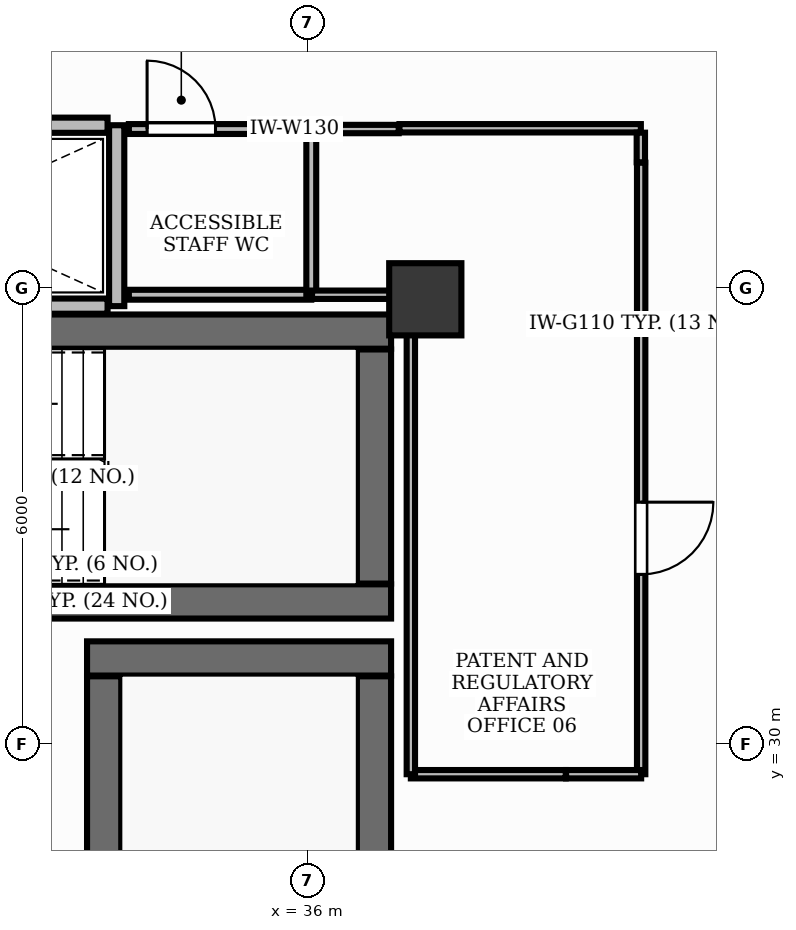
"""IFC4 building model, lengths in metres.
Left out: names, types, materials, properties, quantities, classifications, styles, units other than length and angle.
Written with IfcOpenShell. Run it as: python <this file> out.ifc"""

import sys

from ifc_helpers import new_model, si_unit, direction, frame, frame_2d, origin, origin_2d, place, context, subcontext, project, spatial, rectangle, extrude, element, fill, save


model = new_model("IFC4")
c1 = context("Model", 3, precision=1e-05, world=origin(), true_north=direction((0.0, 1.0)))
c2 = subcontext(c1, "Body", "Model", "MODEL_VIEW")
j1 = project(units=[si_unit("LENGTHUNIT", "METRE"), si_unit("PLANEANGLEUNIT", "RADIAN")], contexts=[c1])
p1 = place(None, origin())
s1 = spatial("IfcSite", under=j1, at=p1, CompositionType="ELEMENT")
p2 = place(p1, origin())
s2 = spatial("IfcBuilding", under=s1, at=p2, CompositionType="ELEMENT")
p3 = place(p2, frame((0.0, 0.0, 123.6)))
s3 = spatial("IfcBuildingStorey", under=s2, at=p3, CompositionType="ELEMENT", Elevation=123.6)
p4 = place(p3, frame((28.852, 35.425, 0.0), z_axis=(0.0, 0.0, 1.0), x_axis=(1.0, 0.0, 0.0)))
e1 = element("IfcWall", 1, at=p4, inside=s3, PredefinedType="SHEAR", context=c2, shape_type="SweptSolid", body=[
    extrude(rectangle(XDim=8.248, YDim=0.45, at=frame_2d((4.124, 0.0))), origin(), (0.0, 0.0, 1.0), 3.9),
])
p5 = place(p3, frame((28.35, 31.875, 0.0), z_axis=(0.0, 0.0, 1.0), x_axis=(1.0, 0.0, 0.0)))
e2 = element("IfcWall", 2, at=p5, inside=s3, PredefinedType="SHEAR", context=c2, shape_type="SweptSolid", body=[
    extrude(rectangle(XDim=8.75, YDim=0.45, at=frame_2d((4.375, 0.0))), origin(), (0.0, 0.0, 1.0), 3.9),
])
p6 = place(p3, frame((36.875, 32.11, 0.0), z_axis=(0.0, 0.0, 1.0), x_axis=(0.0, 1.0, 0.0)))
e3 = element("IfcWall", 3, at=p6, inside=s3, PredefinedType="SHEAR", context=c2, shape_type="SweptSolid", body=[
    extrude(rectangle(XDim=3.08, YDim=0.45, at=frame_2d((1.54, 0.0))), origin(), (0.0, 0.0, 1.0), 3.9),
])
p7 = place(p3, frame((33.1, 31.125, 0.0), z_axis=(0.0, 0.0, 1.0), x_axis=(1.0, 0.0, 0.0)))
e4 = element("IfcWall", 4, at=p7, inside=s3, PredefinedType="SHEAR", context=c2, shape_type="SweptSolid", body=[
    extrude(rectangle(XDim=4.0, YDim=0.45, at=frame_2d((2.0, 0.0))), origin(), (0.0, 0.0, 1.0), 3.9),
])
p8 = place(p3, frame((36.875, 23.11, 0.0), z_axis=(0.0, 0.0, 1.0), x_axis=(0.0, 1.0, 0.0)))
e5 = element("IfcWall", 5, at=p8, inside=s3, PredefinedType="SHEAR", context=c2, shape_type="SweptSolid", body=[
    extrude(rectangle(XDim=7.78, YDim=0.45, at=frame_2d((3.89, 0.0))), origin(), (0.0, 0.0, 1.0), 3.9),
])
p9 = place(p3, frame((33.325, 23.11, 0.0), z_axis=(0.0, 0.0, 1.0), x_axis=(0.0, 1.0, 0.0)))
e6 = element("IfcWall", 6, at=p9, inside=s3, PredefinedType="SHEAR", context=c2, shape_type="SweptSolid", body=[
    extrude(rectangle(XDim=7.78, YDim=0.45, at=frame_2d((3.89, 0.0))), origin(), (0.0, 0.0, 1.0), 3.9),
])
p10 = place(p9, frame((0.2, 0.0, 0.0)))
e7 = element("IfcOpeningElement", 7, at=p10, cuts=e6, PredefinedType="OPENING", context=c2, shape_type="SweptSolid", body=[
    extrude(rectangle(XDim=1.05, YDim=2.15, at=frame_2d((0.525, 1.075))), frame((0.0, 0.24, 0.0), z_axis=(0.0, -1.0, 0.0), x_axis=(1.0, 0.0, 0.0)), (0.0, 0.0, 1.0), 0.48),
])
p11 = place(p3, frame((37.55, 35.85, -0.0), z_axis=(0.0, 0.0, 1.0), x_axis=(1.0, 0.0, 0.0)))
e8 = element("IfcColumn", 8, at=p11, inside=s3, PredefinedType="PILASTER", context=c2, shape_type="SweptSolid", body=[
    extrude(rectangle(XDim=0.95, YDim=0.95, at=origin_2d()), origin(), (0.0, 0.0, 1.0), 3.901),
])
p12 = place(p3, frame((33.49, 35.76, 0.0), z_axis=(0.0, 0.0, 1.0), x_axis=(0.0, 1.0, 0.0)))
e9 = element("IfcWall", 9, at=p12, inside=s3, PredefinedType="PARTITIONING", context=c2, shape_type="SweptSolid", body=[
    extrude(rectangle(XDim=2.38, YDim=0.2, at=frame_2d((1.19, 0.0))), origin(), (0.0, 0.0, 1.0), 2.91),
])
for number, where, z_axis, x_axis in (
    (10, (28.8, 35.76, 0.0), (0.0, 0.0, 1.0), (1.0, 0.0, 0.0)),
    (11, (28.8, 38.14, 0.0), (0.0, 0.0, 1.0), (1.0, 0.0, 0.0)),
):
    element("IfcWall", number, at=place(p3, frame(where, z_axis=z_axis, x_axis=x_axis)), inside=s3, PredefinedType="PARTITIONING", context=c2, shape_type="SweptSolid", body=[
        extrude(rectangle(XDim=4.57, YDim=0.2, at=frame_2d((2.285, 0.0))), origin(), (0.0, 0.0, 1.0), 2.91),
    ])
p13 = place(p3, frame((33.65, 38.09, 0.0), z_axis=(0.0, 0.0, 1.0), x_axis=(1.0, 0.0, 0.0)))
e12 = element("IfcWall", 12, at=p13, inside=s3, PredefinedType="PARTITIONING", context=c2, shape_type="SweptSolid", body=[
    extrude(rectangle(XDim=2.4, YDim=0.13, at=frame_2d((1.2, 0.0))), origin(), (0.0, 0.0, 1.0), 2.91),
])
p14 = place(p13, frame((0.24, 0.0, 0.0)))
e13 = element("IfcOpeningElement", 13, at=p14, cuts=e12, PredefinedType="OPENING", context=c2, shape_type="SweptSolid", body=[
    extrude(rectangle(XDim=0.9, YDim=2.15, at=frame_2d((0.45, 1.075))), frame((0.0, 0.08, 0.0), z_axis=(0.0, -1.0, 0.0), x_axis=(1.0, 0.0, 0.0)), (0.0, 0.0, 1.0), 0.16),
])
p15 = place(p3, frame((40.39, 37.648, 0.0), z_axis=(0.0, 0.0, 1.0), x_axis=(0.0, -1.0, 0.0)))
e14 = element("IfcWall", 14, at=p15, inside=s3, PredefinedType="MOVABLE", context=c2, shape_type="SweptSolid", body=[
    extrude(rectangle(XDim=8.046, YDim=0.11, at=frame_2d((4.023, 0.0))), origin(), (0.0, 0.0, 1.0), 2.91),
])
p16 = place(p15, frame((4.467, 0.0, 0.0)))
e15 = element("IfcOpeningElement", 15, at=p16, cuts=e14, PredefinedType="OPENING", context=c2, shape_type="SweptSolid", body=[
    extrude(rectangle(XDim=0.95, YDim=2.15, at=frame_2d((0.475, 1.075))), frame((0.0, 0.07, 0.0), z_axis=(0.0, -1.0, 0.0), x_axis=(1.0, 0.0, 0.0)), (0.0, 0.0, 1.0), 0.14),
])
p17 = place(p3, frame((36.05, 35.91, 0.0), z_axis=(0.0, 0.0, 1.0), x_axis=(-1.0, 0.0, 0.0)))
e16 = element("IfcWall", 16, at=p17, inside=s3, PredefinedType="PARTITIONING", context=c2, shape_type="SweptSolid", body=[
    extrude(rectangle(XDim=2.4, YDim=0.13, at=frame_2d((1.2, 0.0))), origin(), (0.0, 0.0, 1.0), 2.91),
])
p18 = place(p3, frame((36.05, 38.09, 0.0), z_axis=(0.0, 0.0, 1.0), x_axis=(0.0, -1.0, 0.0)))
e17 = element("IfcWall", 17, at=p18, inside=s3, PredefinedType="PARTITIONING", context=c2, shape_type="SweptSolid", body=[
    extrude(rectangle(XDim=2.18, YDim=0.13, at=frame_2d((1.09, 0.0))), origin(), (0.0, 0.0, 1.0), 2.91),
])
p19 = place(p3, frame((40.39, 29.602, 0.0), z_axis=(0.0, 0.0, 1.0), x_axis=(-1.0, 0.0, 0.0)))
e18 = element("IfcWall", 18, at=p19, inside=s3, PredefinedType="MOVABLE", context=c2, shape_type="SweptSolid", body=[
    extrude(rectangle(XDim=0.988, YDim=0.11, at=frame_2d((0.494, 0.0))), origin(), (0.0, 0.0, 1.0), 2.91),
])
p20 = place(p3, frame((39.398, 29.602, 0.0), z_axis=(0.0, 0.0, 1.0), x_axis=(-1.0, 0.0, 0.0)))
e19 = element("IfcWall", 19, at=p20, inside=s3, PredefinedType="MOVABLE", context=c2, shape_type="SweptSolid", body=[
    extrude(rectangle(XDim=2.038, YDim=0.11, at=frame_2d((1.019, 0.0))), origin(), (0.0, 0.0, 1.0), 2.91),
])
p21 = place(p3, frame((37.36, 29.602, 0.0), z_axis=(0.0, 0.0, 1.0), x_axis=(0.0, 1.0, 0.0)))
e20 = element("IfcWall", 20, at=p21, inside=s3, PredefinedType="MOVABLE", context=c2, shape_type="SweptSolid", body=[
    extrude(rectangle(XDim=6.298, YDim=0.11, at=frame_2d((3.149, 0.0))), origin(), (0.0, 0.0, 1.0), 2.91),
])
p22 = place(p3, frame((37.35, 35.91, 0.0), z_axis=(0.0, 0.0, 1.0), x_axis=(-1.0, 0.0, 0.0)))
e21 = element("IfcWall", 21, at=p22, inside=s3, PredefinedType="MOVABLE", context=c2, shape_type="SweptSolid", body=[
    extrude(rectangle(XDim=1.29, YDim=0.11, at=frame_2d((0.645, 0.0))), origin(), (0.0, 0.0, 1.0), 2.91),
])
p23 = place(p3, frame((36.06, 38.09, 0.0), z_axis=(0.0, 0.0, 1.0), x_axis=(1.0, 0.0, 0.0)))
e22 = element("IfcWall", 22, at=p23, inside=s3, PredefinedType="MOVABLE", context=c2, shape_type="SweptSolid", body=[
    extrude(rectangle(XDim=1.14, YDim=0.11, at=frame_2d((0.57, 0.0))), origin(), (0.0, 0.0, 1.0), 2.91),
])
p24 = place(p3, frame((37.21, 38.1, 0.0), z_axis=(0.0, 0.0, 1.0), x_axis=(1.0, 0.0, 0.0)))
e23 = element("IfcWall", 23, at=p24, inside=s3, PredefinedType="MOVABLE", context=c2, shape_type="SweptSolid", body=[
    extrude(rectangle(XDim=3.176, YDim=0.11, at=frame_2d((1.588, 0.0))), origin(), (0.0, 0.0, 1.0), 2.91),
])
p25 = place(p3, frame((40.386, 38.042, 0.0), z_axis=(0.0, 0.0, 1.0), x_axis=(0.0, -1.0, 0.0)))
e24 = element("IfcWall", 24, at=p25, inside=s3, PredefinedType="MOVABLE", context=c2, shape_type="SweptSolid", body=[
    extrude(rectangle(XDim=0.39, YDim=0.11, at=frame_2d((0.195, 0.0))), origin(), (0.0, 0.0, 1.0), 2.91),
])
p26 = place(p14, origin())
e25 = element("IfcDoor", 25, at=p26, inside=s3, OperationType="SINGLE_SWING_LEFT", PredefinedType="DOOR", context=c2, shape_type="SweptSolid", body=[
    extrude(rectangle(XDim=0.9, YDim=2.15, at=frame_2d((0.45, 1.075))), frame((0.0, 0.025, 0.0), z_axis=(0.0, -1.0, 0.0), x_axis=(1.0, 0.0, 0.0)), (0.0, 0.0, 1.0), 0.05),
])
fill(e13, e25)
p27 = place(p16, origin())
e26 = element("IfcDoor", 26, at=p27, inside=s3, OperationType="SINGLE_SWING_LEFT", PredefinedType="DOOR", context=c2, shape_type="SweptSolid", body=[
    extrude(rectangle(XDim=0.95, YDim=2.15, at=frame_2d((0.475, 1.075))), frame((0.0, 0.025, 0.0), z_axis=(0.0, -1.0, 0.0), x_axis=(1.0, 0.0, 0.0)), (0.0, 0.0, 1.0), 0.05),
])
fill(e15, e26)
save(model, sys.argv[1])
